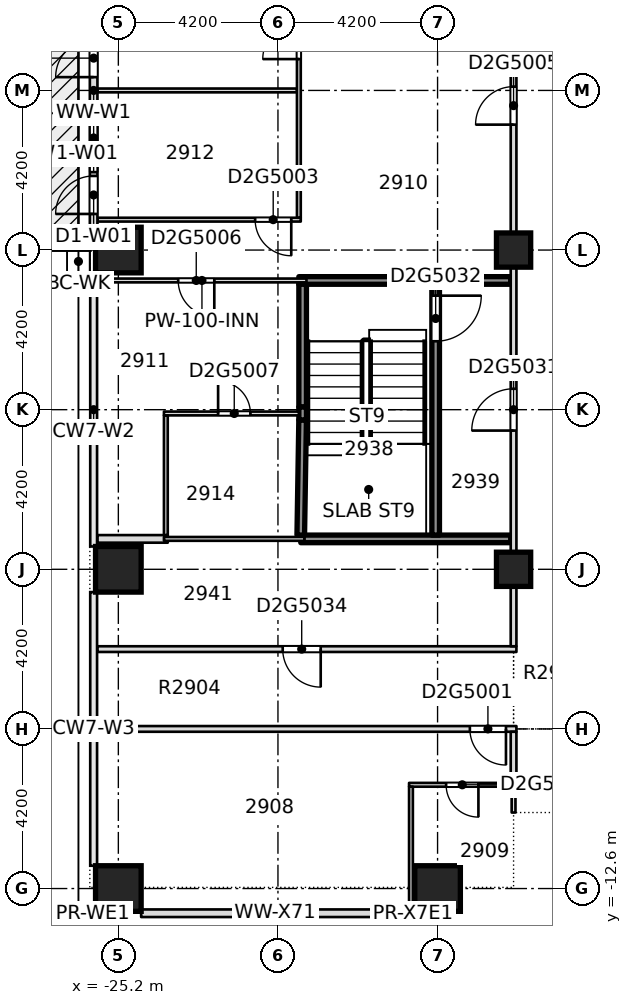
"""IFC4 building model, lengths in metres.
Left out: names, types, materials, properties, quantities, classifications, styles, units other than length and angle.
Written with IfcOpenShell. Run it as: python <this file> out.ifc"""

import sys

from ifc_helpers import new_model, si_unit, direction, frame, frame_2d, origin, origin_2d, place, context, subcontext, project, spatial, rectangle, extrude, element, fill, save


model = new_model("IFC4")
c1 = context("Model", 3, precision=1e-05, world=origin(), true_north=direction((0.0, 1.0)))
c2 = subcontext(c1, "Body", "Model", "MODEL_VIEW")
j1 = project(units=[si_unit("LENGTHUNIT", "METRE"), si_unit("PLANEANGLEUNIT", "RADIAN")], contexts=[c1])
p1 = place(None, origin())
s1 = spatial("IfcSite", under=j1, at=p1, CompositionType="ELEMENT")
p2 = place(p1, origin())
s2 = spatial("IfcBuilding", under=s1, at=p2, CompositionType="ELEMENT")
p3 = place(p2, frame((0.0, 0.0, 114.9)))
s3 = spatial("IfcBuildingStorey", under=s2, at=p3, CompositionType="ELEMENT", Elevation=114.9)
for number, where, z_axis, x_axis in (
    (1, (-25.2, -12.6, -0.32), (0.0, 0.0, 1.0), (1.0, 0.0, 0.0)),
    (2, (-16.8, -12.6, -0.32), (0.0, 0.0, 1.0), (1.0, 0.0, 0.0)),
    (3, (-25.2, -4.2, -0.32), (0.0, 0.0, 1.0), (1.0, 0.0, 0.0)),
    (4, (-25.2, 4.2, -0.32), (0.0, 0.0, 1.0), (1.0, 0.0, 0.0)),
):
    element("IfcColumn", number, at=place(p3, frame(where, z_axis=z_axis, x_axis=x_axis)), inside=s3, PredefinedType="COLUMN", context=c2, shape_type="SweptSolid", body=[
        extrude(rectangle(XDim=1.2, YDim=1.2, at=origin_2d()), origin(), (0.0, 0.0, 1.0), 3.45),
    ])
for number, where, z_axis, x_axis in (
    (5, (-14.8, -4.2, -0.32), (0.0, 0.0, 1.0), (1.0, 0.0, 0.0)),
    (6, (-14.8, 4.2, -0.32), (0.0, 0.0, 1.0), (1.0, 0.0, 0.0)),
):
    element("IfcColumn", number, at=place(p3, frame(where, z_axis=z_axis, x_axis=x_axis)), inside=s3, PredefinedType="COLUMN", context=c2, shape_type="SweptSolid", body=[
        extrude(rectangle(XDim=0.9, YDim=0.9, at=origin_2d()), origin(), (0.0, 0.0, 1.0), 3.45),
    ])
p4 = place(p3, frame((-17.55, -9.87, 0.0), z_axis=(0.0, 0.0, 1.0), x_axis=(1.0, 0.0, 0.0)))
e7 = element("IfcWall", 7, at=p4, inside=s3, PredefinedType="PARTITIONING", context=c2, shape_type="SweptSolid", body=[
    extrude(rectangle(XDim=2.825, YDim=0.1, at=frame_2d((1.413, 0.0))), origin(), (0.0, 0.0, 1.0), 3.13),
])
p5 = place(p4, frame((0.975, 0.0, 0.0)))
e8 = element("IfcOpeningElement", 8, at=p5, cuts=e7, PredefinedType="OPENING", context=c2, shape_type="SweptSolid", body=[
    extrude(rectangle(XDim=0.85, YDim=2.1, at=frame_2d((0.425, 1.05))), frame((0.0, 0.06, 0.0), z_axis=(0.0, -1.0, 0.0), x_axis=(1.0, 0.0, 0.0)), (0.0, 0.0, 1.0), 0.12),
])
p6 = place(p3, frame((-25.75, -8.4, 0.0), z_axis=(0.0, 0.0, 1.0), x_axis=(1.0, 0.0, 0.0)))
e9 = element("IfcWall", 9, at=p6, inside=s3, PredefinedType="PARTITIONING", context=c2, shape_type="SweptSolid", body=[
    extrude(rectangle(XDim=11.025, YDim=0.15, at=frame_2d((5.512, 0.0))), origin(), (0.0, 0.0, 1.0), 3.13),
])
p7 = place(p6, frame((9.8, 0.0, 0.0)))
e10 = element("IfcOpeningElement", 10, at=p7, cuts=e9, PredefinedType="OPENING", context=c2, shape_type="SweptSolid", body=[
    extrude(rectangle(XDim=0.95, YDim=2.1, at=frame_2d((0.475, 1.05))), frame((0.0, 0.085, 0.0), z_axis=(0.0, -1.0, 0.0), x_axis=(1.0, 0.0, 0.0)), (0.0, 0.0, 1.0), 0.17),
])
p8 = place(p3, frame((-25.75, -6.3, 0.0), z_axis=(0.0, 0.0, 1.0), x_axis=(1.0, 0.0, 0.0)))
e11 = element("IfcWall", 11, at=p8, inside=s3, PredefinedType="PARTITIONING", context=c2, shape_type="SweptSolid", body=[
    extrude(rectangle(XDim=11.025, YDim=0.15, at=frame_2d((5.512, 0.0))), origin(), (0.0, 0.0, 1.0), 3.13),
])
p9 = place(p8, frame((4.875, 0.0, 0.0)))
e12 = element("IfcOpeningElement", 12, at=p9, cuts=e11, PredefinedType="OPENING", context=c2, shape_type="SweptSolid", body=[
    extrude(rectangle(XDim=1.0, YDim=2.1, at=frame_2d((0.5, 1.05))), frame((0.0, 0.085, 0.0), z_axis=(0.0, -1.0, 0.0), x_axis=(1.0, 0.0, 0.0)), (0.0, 0.0, 1.0), 0.17),
])
p10 = place(p3, frame((-25.75, -3.4, 0.0), z_axis=(0.0, 0.0, 1.0), x_axis=(1.0, 0.0, 0.0)))
e13 = element("IfcWall", 13, at=p10, inside=s3, PredefinedType="PARTITIONING", context=c2, shape_type="SweptSolid", body=[
    extrude(rectangle(XDim=1.85, YDim=0.2, at=frame_2d((0.925, 0.0))), origin(), (0.0, 0.0, 1.0), 3.13),
])
p11 = place(p3, frame((-24.0, -3.4, 0.0), z_axis=(0.0, 0.0, 1.0), x_axis=(1.0, 0.0, 0.0)))
e14 = element("IfcWall", 14, at=p11, inside=s3, PredefinedType="PARTITIONING", context=c2, shape_type="SweptSolid", body=[
    extrude(rectangle(XDim=3.7, YDim=0.1, at=frame_2d((1.85, 0.0))), origin(), (0.0, 0.0, 1.0), 3.13),
])
p12 = place(p3, frame((-20.4, -3.4, 0.0), z_axis=(0.0, 0.0, 1.0), x_axis=(1.0, 0.0, 0.0)))
e15 = element("IfcWall", 15, at=p12, inside=s3, PredefinedType="SOLIDWALL", context=c2, shape_type="SweptSolid", body=[
    extrude(rectangle(XDim=5.525, YDim=0.2, at=frame_2d((2.762, 0.0))), origin(), (0.0, 0.0, 1.0), 3.13),
])
p13 = place(p3, frame((-24.0, -0.1, 0.0), z_axis=(0.0, 0.0, 1.0), x_axis=(1.0, 0.0, 0.0)))
e16 = element("IfcWall", 16, at=p13, inside=s3, PredefinedType="PARTITIONING", context=c2, shape_type="SweptSolid", body=[
    extrude(rectangle(XDim=3.55, YDim=0.1, at=frame_2d((1.775, 0.0))), origin(), (0.0, 0.0, 1.0), 3.13),
])
p14 = place(p13, frame((1.425, 0.0, 0.0)))
e17 = element("IfcOpeningElement", 17, at=p14, cuts=e16, PredefinedType="OPENING", context=c2, shape_type="SweptSolid", body=[
    extrude(rectangle(XDim=0.85, YDim=2.1, at=frame_2d((0.425, 1.05))), frame((0.0, 0.06, 0.0), z_axis=(0.0, -1.0, 0.0), x_axis=(1.0, 0.0, 0.0)), (0.0, 0.0, 1.0), 0.12),
])
p15 = place(p3, frame((-25.75, 3.4, 0.0), z_axis=(0.0, 0.0, 1.0), x_axis=(1.0, 0.0, 0.0)))
e18 = element("IfcWall", 18, at=p15, inside=s3, PredefinedType="PARTITIONING", context=c2, shape_type="SweptSolid", body=[
    extrude(rectangle(XDim=5.5, YDim=0.1, at=frame_2d((2.75, 0.0))), origin(), (0.0, 0.0, 1.0), 3.13),
])
p16 = place(p15, frame((2.125, 0.0, 0.0)))
e19 = element("IfcOpeningElement", 19, at=p16, cuts=e18, PredefinedType="OPENING", context=c2, shape_type="SweptSolid", body=[
    extrude(rectangle(XDim=0.95, YDim=2.1, at=frame_2d((0.475, 1.05))), frame((0.0, 0.06, 0.0), z_axis=(0.0, -1.0, 0.0), x_axis=(1.0, 0.0, 0.0)), (0.0, 0.0, 1.0), 0.12),
])
p17 = place(p3, frame((-20.45, 3.4, 0.0), z_axis=(0.0, 0.0, 1.0), x_axis=(1.0, 0.0, 0.0)))
e20 = element("IfcWall", 20, at=p17, inside=s3, PredefinedType="SOLIDWALL", context=c2, shape_type="SweptSolid", body=[
    extrude(rectangle(XDim=5.575, YDim=0.2, at=frame_2d((2.788, 0.0))), origin(), (0.0, 0.0, 1.0), 3.13),
])
p18 = place(p3, frame((-25.75, 5.0, 0.0), z_axis=(0.0, 0.0, 1.0), x_axis=(1.0, 0.0, 0.0)))
e21 = element("IfcWall", 21, at=p18, inside=s3, PredefinedType="PARTITIONING", context=c2, shape_type="SweptSolid", body=[
    extrude(rectangle(XDim=5.35, YDim=0.1, at=frame_2d((2.675, 0.0))), origin(), (0.0, 0.0, 1.0), 3.13),
])
p19 = place(p18, frame((4.15, 0.0, 0.0)))
e22 = element("IfcOpeningElement", 22, at=p19, cuts=e21, PredefinedType="OPENING", context=c2, shape_type="SweptSolid", body=[
    extrude(rectangle(XDim=0.95, YDim=2.1, at=frame_2d((0.475, 1.05))), frame((0.0, 0.06, 0.0), z_axis=(0.0, -1.0, 0.0), x_axis=(1.0, 0.0, 0.0)), (0.0, 0.0, 1.0), 0.12),
])
p20 = place(p3, frame((-25.75, 8.4, 0.0), z_axis=(0.0, 0.0, 1.0), x_axis=(1.0, 0.0, 0.0)))
e23 = element("IfcWall", 23, at=p20, inside=s3, PredefinedType="PARTITIONING", context=c2, shape_type="SweptSolid", body=[
    extrude(rectangle(XDim=5.25, YDim=0.1, at=frame_2d((2.625, 0.0))), origin(), (0.0, 0.0, 1.0), 3.13),
])
p21 = place(p3, frame((-23.95, -3.3, 0.0), z_axis=(0.0, 0.0, 1.0), x_axis=(0.0, 1.0, 0.0)))
e24 = element("IfcWall", 24, at=p21, inside=s3, PredefinedType="PARTITIONING", context=c2, shape_type="SweptSolid", body=[
    extrude(rectangle(XDim=3.15, YDim=0.1, at=frame_2d((1.575, 0.0))), origin(), (0.0, 0.0, 1.0), 3.13),
])
p22 = place(p3, frame((-20.45, 5.05, 0.0), z_axis=(0.0, 0.0, 1.0), x_axis=(0.0, 1.0, 0.0)))
e25 = element("IfcWall", 25, at=p22, inside=s3, PredefinedType="PARTITIONING", context=c2, shape_type="SweptSolid", body=[
    extrude(rectangle(XDim=7.475, YDim=0.1, at=frame_2d((3.737, 0.0))), origin(), (0.0, 0.0, 1.0), 3.13),
])
p23 = place(p22, frame((4.175, 0.0, 0.0)))
e26 = element("IfcOpeningElement", 26, at=p23, cuts=e25, PredefinedType="OPENING", context=c2, shape_type="SweptSolid", body=[
    extrude(rectangle(XDim=0.95, YDim=2.1, at=frame_2d((0.475, 1.05))), frame((0.0, 0.06, 0.0), z_axis=(0.0, -1.0, 0.0), x_axis=(1.0, 0.0, 0.0)), (0.0, 0.0, 1.0), 0.12),
])
p24 = place(p3, frame((-20.4, -3.3, 0.0), z_axis=(0.0, 0.0, 1.0), x_axis=(0.016112644959, 0.99987018291, 0.0)))
e27 = element("IfcWall", 27, at=p24, inside=s3, PredefinedType="SOLIDWALL", context=c2, shape_type="SweptSolid", body=[
    extrude(rectangle(XDim=3.031, YDim=0.2, at=frame_2d((1.515, 0.0))), origin(), (0.0, 0.0, 1.0), 3.13),
])
p25 = place(p3, frame((-20.35, 0.07, 0.0), z_axis=(0.0, 0.0, 1.0), x_axis=(0.0, 1.0, 0.0)))
e28 = element("IfcWall", 28, at=p25, inside=s3, PredefinedType="SOLIDWALL", context=c2, shape_type="SweptSolid", body=[
    extrude(rectangle(XDim=3.23, YDim=0.2, at=frame_2d((1.615, 0.0))), origin(), (0.0, 0.0, 1.0), 3.13),
])
p26 = place(p3, frame((-17.5, -13.35, 0.0), z_axis=(0.0, 0.0, 1.0), x_axis=(0.0, 1.0, 0.0)))
e29 = element("IfcWall", 29, at=p26, inside=s3, PredefinedType="PARTITIONING", context=c2, shape_type="SweptSolid", body=[
    extrude(rectangle(XDim=3.43, YDim=0.1, at=frame_2d((1.715, 0.0))), origin(), (0.0, 0.0, 1.0), 3.13),
])
p27 = place(p3, frame((-16.85, -3.3, 0.0), z_axis=(0.0, 0.0, 1.0), x_axis=(0.0, 1.0, 0.0)))
e30 = element("IfcWall", 30, at=p27, inside=s3, PredefinedType="SOLIDWALL", context=c2, shape_type="SweptSolid", body=[
    extrude(rectangle(XDim=6.6, YDim=0.2, at=frame_2d((3.3, 0.0))), origin(), (0.0, 0.0, 1.0), 3.13),
])
p28 = place(p27, frame((5.1, 0.0, 0.0)))
e31 = element("IfcOpeningElement", 31, at=p28, cuts=e30, PredefinedType="OPENING", context=c2, shape_type="SweptSolid", body=[
    extrude(rectangle(XDim=1.2, YDim=2.1, at=frame_2d((0.6, 1.05))), frame((0.0, 0.11, 0.0), z_axis=(0.0, -1.0, 0.0), x_axis=(1.0, 0.0, 0.0)), (0.0, 0.0, 1.0), 0.22),
])
p29 = place(p3, frame((-14.8, -10.6, 0.0), z_axis=(0.0, 0.0, 1.0), x_axis=(0.0, 1.0, 0.0)))
e32 = element("IfcWall", 32, at=p29, inside=s3, PredefinedType="PARTITIONING", context=c2, shape_type="SweptSolid", body=[
    extrude(rectangle(XDim=0.68, YDim=0.1, at=frame_2d((0.34, 0.0))), origin(), (0.0, 0.0, 1.0), 3.13),
])
p30 = place(p3, frame((-14.8, -9.82, 0.0), z_axis=(0.0, 0.0, 1.0), x_axis=(0.0, 1.0, 0.0)))
e33 = element("IfcWall", 33, at=p30, inside=s3, PredefinedType="PARTITIONING", context=c2, shape_type="SweptSolid", body=[
    extrude(rectangle(XDim=1.345, YDim=0.15, at=frame_2d((0.672, 0.0))), origin(), (0.0, 0.0, 1.0), 3.13),
])
p31 = place(p3, frame((-14.8, -6.225, 0.0), z_axis=(0.0, 0.0, 1.0), x_axis=(0.0, 1.0, 0.0)))
e34 = element("IfcWall", 34, at=p31, inside=s3, PredefinedType="PARTITIONING", context=c2, shape_type="SweptSolid", body=[
    extrude(rectangle(XDim=18.75, YDim=0.15, at=frame_2d((9.375, 0.0))), origin(), (0.0, 0.0, 1.0), 3.13),
])
p32 = place(p31, frame((13.725, 0.0, 0.0)))
e35 = element("IfcOpeningElement", 35, at=p32, cuts=e34, PredefinedType="OPENING", context=c2, shape_type="SweptSolid", body=[
    extrude(rectangle(XDim=1.0, YDim=2.1, at=frame_2d((0.5, 1.05))), frame((0.0, 0.085, 0.0), z_axis=(0.0, -1.0, 0.0), x_axis=(1.0, 0.0, 0.0)), (0.0, 0.0, 1.0), 0.17),
])
p33 = place(p31, frame((5.675, 0.0, 0.0)))
e36 = element("IfcOpeningElement", 36, at=p33, cuts=e34, PredefinedType="OPENING", context=c2, shape_type="SweptSolid", body=[
    extrude(rectangle(XDim=1.1, YDim=2.1, at=frame_2d((0.55, 1.05))), frame((0.0, 0.085, 0.0), z_axis=(0.0, -1.0, 0.0), x_axis=(1.0, 0.0, 0.0)), (0.0, 0.0, 1.0), 0.17),
])
p34 = place(p3, frame((-25.85, 12.0, 0.0), z_axis=(0.0, 0.0, 1.0), x_axis=(0.0, -1.0, 0.0)))
e37 = element("IfcWall", 37, at=p34, inside=s3, PredefinedType="STANDARD", context=c2, shape_type="SweptSolid", body=[
    extrude(rectangle(XDim=7.2, YDim=0.2, at=frame_2d((3.6, 0.0))), origin(), (0.0, 0.0, 1.0), 3.13),
])
p35 = place(p34, frame((3.95, 0.0, 0.2)))
e38 = element("IfcOpeningElement", 38, at=p35, cuts=e37, PredefinedType="OPENING", context=c2, shape_type="SweptSolid", body=[
    extrude(rectangle(XDim=1.8, YDim=2.65, at=frame_2d((0.9, 1.325))), frame((0.0, 0.11, 0.0), z_axis=(0.0, -1.0, 0.0), x_axis=(1.0, 0.0, 0.0)), (0.0, 0.0, 1.0), 0.22),
])
p36 = place(p34, frame((5.85, 0.0, 0.0)))
e39 = element("IfcOpeningElement", 39, at=p36, cuts=e37, PredefinedType="OPENING", context=c2, shape_type="SweptSolid", body=[
    extrude(rectangle(XDim=1.0, YDim=2.4, at=frame_2d((0.5, 1.2))), frame((0.0, 0.11, 0.0), z_axis=(0.0, -1.0, 0.0), x_axis=(1.0, 0.0, 0.0)), (0.0, 0.0, 1.0), 0.22),
])
p37 = place(p34, frame((0.35, 0.0, 0.2)))
e40 = element("IfcOpeningElement", 40, at=p37, cuts=e37, PredefinedType="OPENING", context=c2, shape_type="SweptSolid", body=[
    extrude(rectangle(XDim=1.8, YDim=2.65, at=frame_2d((0.9, 1.325))), frame((0.0, 0.11, 0.0), z_axis=(0.0, -1.0, 0.0), x_axis=(1.0, 0.0, 0.0)), (0.0, 0.0, 1.0), 0.22),
])
p38 = place(p34, frame((2.25, 0.0, 0.0)))
e41 = element("IfcOpeningElement", 41, at=p38, cuts=e37, PredefinedType="OPENING", context=c2, shape_type="SweptSolid", body=[
    extrude(rectangle(XDim=1.0, YDim=2.4, at=frame_2d((0.5, 1.2))), frame((0.0, 0.11, 0.0), z_axis=(0.0, -1.0, 0.0), x_axis=(1.0, 0.0, 0.0)), (0.0, 0.0, 1.0), 0.22),
])
p39 = place(p3, frame((-24.6, -13.25, 0.0), z_axis=(0.0, 0.0, 1.0), x_axis=(1.0, 0.0, 0.0)))
e42 = element("IfcWall", 42, at=p39, inside=s3, PredefinedType="STANDARD", context=c2, shape_type="SweptSolid", body=[
    extrude(rectangle(XDim=7.05, YDim=0.2, at=frame_2d((3.525, 0.0))), origin(), (0.0, 0.0, 1.0), 3.13),
])
p40 = place(p3, frame((-17.45, -13.35, 0.0), z_axis=(0.0, 0.0, 1.0), x_axis=(0.0, -1.0, 0.0)))
e43 = element("IfcWall", 43, at=p40, inside=s3, PredefinedType="STANDARD", context=c2, shape_type="SweptSolid", body=[
    extrude(rectangle(XDim=7.05, YDim=0.2, at=frame_2d((3.525, 0.0))), origin(), (0.0, 0.0, 1.0), 3.13),
])
p41 = place(p40, frame((3.8, 0.0, 0.2)))
e44 = element("IfcOpeningElement", 44, at=p41, cuts=e43, PredefinedType="OPENING", context=c2, shape_type="SweptSolid", body=[
    extrude(rectangle(XDim=1.8, YDim=2.65, at=frame_2d((0.9, 1.325))), frame((0.0, 0.11, 0.0), z_axis=(0.0, -1.0, 0.0), x_axis=(1.0, 0.0, 0.0)), (0.0, 0.0, 1.0), 0.22),
])
p42 = place(p40, frame((0.275, 0.0, 0.2)))
e45 = element("IfcOpeningElement", 45, at=p42, cuts=e43, PredefinedType="OPENING", context=c2, shape_type="SweptSolid", body=[
    extrude(rectangle(XDim=1.8, YDim=2.65, at=frame_2d((0.9, 1.325))), frame((0.0, 0.11, 0.0), z_axis=(0.0, -1.0, 0.0), x_axis=(1.0, 0.0, 0.0)), (0.0, 0.0, 1.0), 0.22),
])
p43 = place(p3, frame((-20.35, -0.27, 0.0), z_axis=(0.0, 0.0, 1.0), x_axis=(0.0, 1.0, 0.0)))
e46 = element("IfcWall", 46, at=p43, inside=s3, PredefinedType="SOLIDWALL", context=c2, shape_type="SweptSolid", body=[
    extrude(rectangle(XDim=0.34, YDim=0.2, at=frame_2d((0.17, 0.0))), origin(), (0.0, 0.0, 1.0), 3.13),
])
p44 = place(p7, origin())
e47 = element("IfcDoor", 47, at=p44, inside=s3, OperationType="SINGLE_SWING_RIGHT", PredefinedType="DOOR", context=c2, shape_type="SweptSolid", body=[
    extrude(rectangle(XDim=0.95, YDim=2.1, at=frame_2d((0.475, 1.05))), frame((0.0, 0.025, 0.0), z_axis=(0.0, -1.0, 0.0), x_axis=(1.0, 0.0, 0.0)), (0.0, 0.0, 1.0), 0.05),
])
fill(e10, e47)
p45 = place(p5, origin())
e48 = element("IfcDoor", 48, at=p45, inside=s3, OperationType="SINGLE_SWING_RIGHT", PredefinedType="DOOR", context=c2, shape_type="SweptSolid", body=[
    extrude(rectangle(XDim=0.85, YDim=2.1, at=frame_2d((0.425, 1.05))), frame((0.0, 0.025, 0.0), z_axis=(0.0, -1.0, 0.0), x_axis=(1.0, 0.0, 0.0)), (0.0, 0.0, 1.0), 0.05),
])
fill(e8, e48)
p46 = place(p19, origin())
e49 = element("IfcDoor", 49, at=p46, inside=s3, OperationType="SINGLE_SWING_LEFT", PredefinedType="DOOR", context=c2, shape_type="SweptSolid", body=[
    extrude(rectangle(XDim=0.95, YDim=2.1, at=frame_2d((0.475, 1.05))), frame((0.0, 0.025, 0.0), z_axis=(0.0, -1.0, 0.0), x_axis=(1.0, 0.0, 0.0)), (0.0, 0.0, 1.0), 0.05),
])
fill(e22, e49)
p47 = place(p23, origin())
e50 = element("IfcDoor", 50, at=p47, inside=s3, OperationType="SINGLE_SWING_LEFT", PredefinedType="DOOR", context=c2, shape_type="SweptSolid", body=[
    extrude(rectangle(XDim=0.95, YDim=2.1, at=frame_2d((0.475, 1.05))), frame((0.0, 0.025, 0.0), z_axis=(0.0, -1.0, 0.0), x_axis=(1.0, 0.0, 0.0)), (0.0, 0.0, 1.0), 0.05),
])
fill(e26, e50)
p48 = place(p32, origin())
e51 = element("IfcDoor", 51, at=p48, inside=s3, OperationType="SINGLE_SWING_LEFT", PredefinedType="DOOR", context=c2, shape_type="SweptSolid", body=[
    extrude(rectangle(XDim=1.0, YDim=2.1, at=frame_2d((0.5, 1.05))), frame((0.0, 0.025, 0.0), z_axis=(0.0, -1.0, 0.0), x_axis=(1.0, 0.0, 0.0)), (0.0, 0.0, 1.0), 0.05),
])
fill(e35, e51)
p49 = place(p16, origin())
e52 = element("IfcDoor", 52, at=p49, inside=s3, OperationType="SINGLE_SWING_LEFT", PredefinedType="DOOR", context=c2, shape_type="SweptSolid", body=[
    extrude(rectangle(XDim=0.95, YDim=2.1, at=frame_2d((0.475, 1.05))), frame((0.0, 0.025, 0.0), z_axis=(0.0, -1.0, 0.0), x_axis=(1.0, 0.0, 0.0)), (0.0, 0.0, 1.0), 0.05),
])
fill(e19, e52)
p50 = place(p14, origin())
e53 = element("IfcDoor", 53, at=p50, inside=s3, OperationType="SINGLE_SWING_RIGHT", PredefinedType="DOOR", context=c2, shape_type="SweptSolid", body=[
    extrude(rectangle(XDim=0.85, YDim=2.1, at=frame_2d((0.425, 1.05))), frame((0.0, 0.025, 0.0), z_axis=(0.0, -1.0, 0.0), x_axis=(1.0, 0.0, 0.0)), (0.0, 0.0, 1.0), 0.05),
])
fill(e17, e53)
p51 = place(p33, origin())
e54 = element("IfcDoor", 54, at=p51, inside=s3, OperationType="SINGLE_SWING_RIGHT", PredefinedType="DOOR", context=c2, shape_type="SweptSolid", body=[
    extrude(rectangle(XDim=1.1, YDim=2.1, at=frame_2d((0.55, 1.05))), frame((0.0, 0.025, 0.0), z_axis=(0.0, -1.0, 0.0), x_axis=(1.0, 0.0, 0.0)), (0.0, 0.0, 1.0), 0.05),
])
fill(e36, e54)
p52 = place(p28, origin())
e55 = element("IfcDoor", 55, at=p52, inside=s3, OperationType="SINGLE_SWING_RIGHT", PredefinedType="DOOR", context=c2, shape_type="SweptSolid", body=[
    extrude(rectangle(XDim=1.2, YDim=2.1, at=frame_2d((0.6, 1.05))), frame((0.0, 0.025, 0.0), z_axis=(0.0, -1.0, 0.0), x_axis=(1.0, 0.0, 0.0)), (0.0, 0.0, 1.0), 0.05),
])
fill(e31, e55)
p53 = place(p9, origin())
e56 = element("IfcDoor", 56, at=p53, inside=s3, OperationType="SINGLE_SWING_RIGHT", PredefinedType="DOOR", context=c2, shape_type="SweptSolid", body=[
    extrude(rectangle(XDim=1.0, YDim=2.1, at=frame_2d((0.5, 1.05))), frame((0.0, 0.025, 0.0), z_axis=(0.0, -1.0, 0.0), x_axis=(1.0, 0.0, 0.0)), (0.0, 0.0, 1.0), 0.05),
])
fill(e12, e56)
p54 = place(p35, origin())
e57 = element("IfcWindow", 57, at=p54, inside=s3, PartitioningType="SINGLE_PANEL", PredefinedType="WINDOW", context=c2, shape_type="SweptSolid", body=[
    extrude(rectangle(XDim=1.8, YDim=2.65, at=frame_2d((0.9, 1.325))), frame((0.0, 0.03, 0.0), z_axis=(0.0, -1.0, 0.0), x_axis=(1.0, 0.0, 0.0)), (0.0, 0.0, 1.0), 0.06),
])
fill(e38, e57)
p55 = place(p36, origin())
e58 = element("IfcDoor", 58, at=p55, inside=s3, OperationType="SINGLE_SWING_LEFT", PredefinedType="DOOR", context=c2, shape_type="SweptSolid", body=[
    extrude(rectangle(XDim=1.0, YDim=2.4, at=frame_2d((0.5, 1.2))), frame((0.0, 0.025, 0.0), z_axis=(0.0, -1.0, 0.0), x_axis=(1.0, 0.0, 0.0)), (0.0, 0.0, 1.0), 0.05),
])
fill(e39, e58)
p56 = place(p38, origin())
e59 = element("IfcDoor", 59, at=p56, inside=s3, OperationType="SINGLE_SWING_LEFT", PredefinedType="DOOR", context=c2, shape_type="SweptSolid", body=[
    extrude(rectangle(XDim=1.0, YDim=2.4, at=frame_2d((0.5, 1.2))), frame((0.0, 0.025, 0.0), z_axis=(0.0, -1.0, 0.0), x_axis=(1.0, 0.0, 0.0)), (0.0, 0.0, 1.0), 0.05),
])
fill(e41, e59)
save(model, sys.argv[1])
